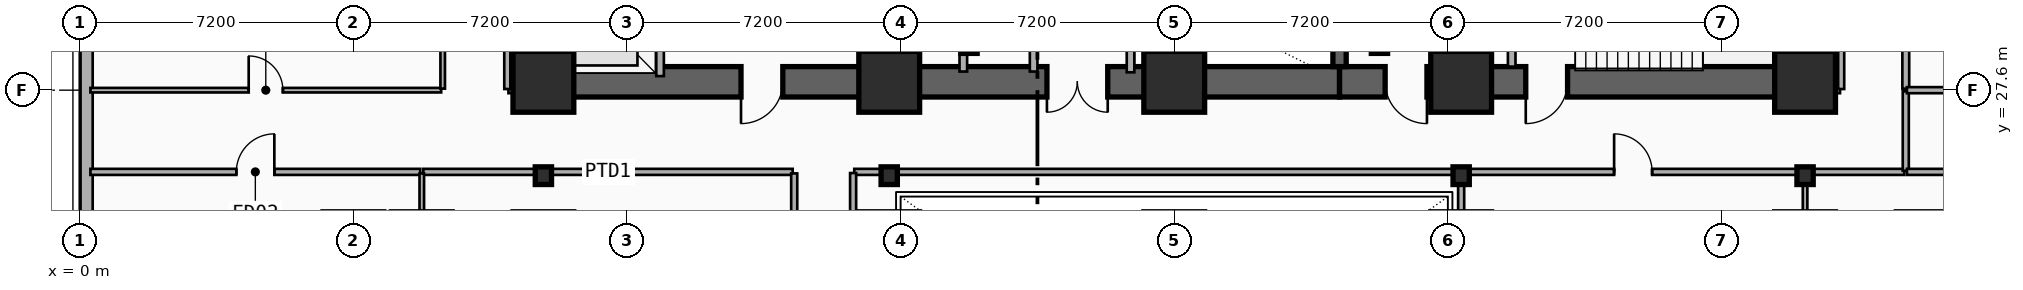
"""IFC4 building model, lengths in metres.
Left out: names, types, materials, properties, quantities, classifications, styles, units other than length and angle.
Written with IfcOpenShell. Run it as: python <this file> out.ifc"""

import sys

from ifc_helpers import new_model, si_unit, direction, frame, frame_2d, origin, origin_2d, place, context, subcontext, project, spatial, rectangle, i_section, extrude, element, fill, save


model = new_model("IFC4")
c1 = context("Model", 3, precision=1e-05, world=origin(), true_north=direction((0.0, 1.0)))
c2 = subcontext(c1, "Body", "Model", "MODEL_VIEW")
j1 = project(units=[si_unit("LENGTHUNIT", "METRE"), si_unit("PLANEANGLEUNIT", "RADIAN")], contexts=[c1])
p1 = place(None, origin())
s1 = spatial("IfcSite", under=j1, at=p1, CompositionType="ELEMENT")
p2 = place(p1, origin())
s2 = spatial("IfcBuilding", under=s1, at=p2, CompositionType="ELEMENT")
p3 = place(p2, frame((0.0, 0.0, 24.2)))
s3 = spatial("IfcBuildingStorey", under=s2, at=p3, CompositionType="ELEMENT", Elevation=24.2)
p4 = place(p3, frame((21.18, 27.82, 0.0), z_axis=(0.0, 0.0, 1.0), x_axis=(-1.0, 0.0, 0.0)))
e1 = element("IfcWall", 1, at=p4, inside=s3, PredefinedType="SHEAR", context=c2, shape_type="SweptSolid", body=[
    extrude(rectangle(XDim=9.03, YDim=0.8, at=frame_2d((4.515, 0.0))), origin(), (0.0, 0.0, 1.0), 4.8),
])
p5 = place(p4, frame((2.68, 0.0, 0.0)))
e2 = element("IfcOpeningElement", 2, at=p5, cuts=e1, PredefinedType="OPENING", context=c2, shape_type="SweptSolid", body=[
    extrude(rectangle(XDim=1.1, YDim=2.15, at=frame_2d((0.55, 1.075))), frame((0.0, 0.41, 0.0), z_axis=(0.0, -1.0, 0.0), x_axis=(1.0, 0.0, 0.0)), (0.0, 0.0, 1.0), 0.82),
])
p6 = place(p3, frame((33.15, 27.82, 0.0), z_axis=(0.0, 0.0, 1.0), x_axis=(-1.0, 0.0, 0.0)))
e3 = element("IfcWall", 3, at=p6, inside=s3, PredefinedType="SHEAR", context=c2, shape_type="SweptSolid", body=[
    extrude(rectangle(XDim=11.97, YDim=0.8, at=frame_2d((5.985, 0.0))), origin(), (0.0, 0.0, 1.0), 4.8),
])
p7 = place(p6, frame((6.1, 0.0, 0.0)))
e4 = element("IfcOpeningElement", 4, at=p7, cuts=e3, PredefinedType="OPENING", context=c2, shape_type="SweptSolid", body=[
    extrude(rectangle(XDim=1.6, YDim=2.2, at=frame_2d((0.8, 1.1))), frame((0.0, 0.41, 0.0), z_axis=(0.0, -1.0, 0.0), x_axis=(1.0, 0.0, 0.0)), (0.0, 0.0, 1.0), 0.82),
])
p8 = place(p3, frame((45.38, 27.82, 0.0), z_axis=(0.0, 0.0, 1.0), x_axis=(-1.0, 0.0, 0.0)))
e5 = element("IfcWall", 5, at=p8, inside=s3, PredefinedType="SHEAR", context=c2, shape_type="SweptSolid", body=[
    extrude(rectangle(XDim=12.23, YDim=0.8, at=frame_2d((6.115, 0.0))), origin(), (0.0, 0.0, 1.0), 4.8),
])
p9 = place(p8, frame((9.93, 0.0, 0.0)))
e6 = element("IfcOpeningElement", 6, at=p9, cuts=e5, PredefinedType="OPENING", context=c2, shape_type="SweptSolid", body=[
    extrude(rectangle(XDim=1.1, YDim=2.15, at=frame_2d((0.55, 1.075))), frame((0.0, 0.41, 0.0), z_axis=(0.0, -1.0, 0.0), x_axis=(1.0, 0.0, 0.0)), (0.0, 0.0, 1.0), 0.82),
])
p10 = place(p8, frame((6.23, 0.0, 0.0)))
e7 = element("IfcOpeningElement", 7, at=p10, cuts=e5, PredefinedType="OPENING", context=c2, shape_type="SweptSolid", body=[
    extrude(rectangle(XDim=1.1, YDim=2.15, at=frame_2d((0.55, 1.075))), frame((0.0, 0.41, 0.0), z_axis=(0.0, -1.0, 0.0), x_axis=(1.0, 0.0, 0.0)), (0.0, 0.0, 1.0), 0.82),
])
for number, where, z_axis, x_axis in (
    (8, (12.15, 28.22, 0.0), (0.0, 0.0, 1.0), (0.0, 1.0, 0.0)),
    (9, (45.38, 28.22, 0.0), (0.0, 0.0, 1.0), (0.0, 1.0, 0.0)),
):
    element("IfcWall", number, at=place(p3, frame(where, z_axis=z_axis, x_axis=x_axis)), inside=s3, PredefinedType="SHEAR", context=c2, shape_type="SweptSolid", body=[
        extrude(rectangle(XDim=8.43, YDim=0.8, at=frame_2d((4.215, 0.0))), origin(), (0.0, 0.0, 1.0), 4.8),
    ])
for number, where, z_axis, x_axis in (
    (10, (21.18, 28.22, 0.0), (0.0, 0.0, 1.0), (0.0, 1.0, 0.0)),
    (11, (33.15, 28.22, 0.0), (0.0, 0.0, 1.0), (0.0, 1.0, 0.0)),
):
    element("IfcWall", number, at=place(p3, frame(where, z_axis=z_axis, x_axis=x_axis)), inside=s3, PredefinedType="SHEAR", context=c2, shape_type="SweptSolid", body=[
        extrude(rectangle(XDim=8.43, YDim=0.35, at=frame_2d((4.215, 0.0))), origin(), (0.0, 0.0, 1.0), 4.8),
    ])
p11 = place(p3, frame((36.38, 28.22, 0.0), z_axis=(0.0, 0.0, 1.0), x_axis=(0.0, 1.0, 0.0)))
e12 = element("IfcWall", 12, at=p11, inside=s3, PredefinedType="SHEAR", context=c2, shape_type="SweptSolid", body=[
    extrude(rectangle(XDim=8.43, YDim=0.35, at=frame_2d((4.215, 0.0))), origin(), (0.0, 0.0, 1.0), 4.8),
])
p12 = place(p11, frame((3.56, 0.0, 0.0)))
e13 = element("IfcOpeningElement", 13, at=p12, cuts=e12, PredefinedType="OPENING", context=c2, shape_type="SweptSolid", body=[
    extrude(rectangle(XDim=1.1, YDim=2.15, at=frame_2d((0.55, 1.075))), frame((0.0, 0.185, 0.0), z_axis=(0.0, -1.0, 0.0), x_axis=(1.0, 0.0, 0.0)), (0.0, 0.0, 1.0), 0.37),
])
for number, where, z_axis, x_axis in (
    (14, (23.4, 28.8, 0.0), (0.0, 0.0, 1.0), (1.0, 0.0, 0.0)),
    (15, (34.2, 28.8, 0.0), (0.0, 0.0, 1.0), (1.0, 0.0, 0.0)),
):
    element("IfcColumn", number, at=place(p3, frame(where, z_axis=z_axis, x_axis=x_axis)), inside=s3, PredefinedType="COLUMN", context=c2, shape_type="SweptSolid", body=[
        extrude(i_section(OverallWidth=0.428, OverallDepth=0.465, WebThickness=0.045, FlangeThickness=0.073, FilletRadius=0.015, at=origin_2d()), origin(), (0.0, 0.0, 1.0), 4.8),
    ])
for number, where, z_axis, x_axis in (
    (16, (12.2, 27.82, 0.0), (0.0, 0.0, 1.0), (1.0, 0.0, 0.0)),
    (17, (21.3, 27.82, 0.0), (0.0, 0.0, 1.0), (1.0, 0.0, 0.0)),
    (18, (28.8, 27.82, 0.0), (0.0, 0.0, 1.0), (1.0, 0.0, 0.0)),
    (19, (36.35, 27.82, 0.0), (0.0, 0.0, 1.0), (1.0, 0.0, 0.0)),
    (20, (45.4, 27.82, 0.0), (0.0, 0.0, 1.0), (1.0, 0.0, 0.0)),
):
    element("IfcColumn", number, at=place(p3, frame(where, z_axis=z_axis, x_axis=x_axis)), inside=s3, PredefinedType="COLUMN", context=c2, shape_type="SweptSolid", body=[
        extrude(rectangle(XDim=1.6, YDim=1.6, at=origin_2d()), origin(), (0.0, 0.0, 1.0), 4.8),
    ])
for number, where, z_axis, x_axis in (
    (21, (12.2, 25.35, 0.0), (0.0, 0.0, 1.0), (1.0, 0.0, 0.0)),
    (22, (21.3, 25.35, 0.0), (0.0, 0.0, 1.0), (1.0, 0.0, 0.0)),
    (23, (36.35, 25.35, 0.0), (0.0, 0.0, 1.0), (1.0, 0.0, 0.0)),
    (24, (45.4, 25.35, 0.0), (0.0, 0.0, 1.0), (1.0, 0.0, 0.0)),
):
    element("IfcColumn", number, at=place(p3, frame(where, z_axis=z_axis, x_axis=x_axis)), inside=s3, PredefinedType="COLUMN", context=c2, shape_type="SweptSolid", body=[
        extrude(i_section(OverallWidth=0.428, OverallDepth=0.465, WebThickness=0.045, FlangeThickness=0.073, FilletRadius=0.015, at=origin_2d()), origin(), (0.0, 0.0, 1.0), 4.8),
    ])
p13 = place(p3, frame((0.18, 7.2, 0.0), z_axis=(0.0, 0.0, 1.0), x_axis=(0.0, 1.0, 0.0)))
e25 = element("IfcWall", 25, at=p13, inside=s3, PredefinedType="SOLIDWALL", context=c2, shape_type="SweptSolid", body=[
    extrude(rectangle(XDim=34.4, YDim=0.32, at=frame_2d((17.2, 0.0))), origin(), (0.0, 0.0, 1.0), 4.48),
])
p14 = place(p13, frame((22.35, 0.0, 0.9)))
e26 = element("IfcOpeningElement", 26, at=p14, cuts=e25, PredefinedType="OPENING", context=c2, shape_type="SweptSolid", body=[
    extrude(rectangle(XDim=2.4, YDim=1.8, at=frame_2d((1.2, 0.9))), frame((0.0, 0.17, 0.0), z_axis=(0.0, -1.0, 0.0), x_axis=(1.0, 0.0, 0.0)), (0.0, 0.0, 1.0), 0.34),
])
p15 = place(p13, frame((26.4, 0.0, 0.9)))
e27 = element("IfcOpeningElement", 27, at=p15, cuts=e25, PredefinedType="OPENING", context=c2, shape_type="SweptSolid", body=[
    extrude(rectangle(XDim=2.4, YDim=1.8, at=frame_2d((1.2, 0.9))), frame((0.0, 0.17, 0.0), z_axis=(0.0, -1.0, 0.0), x_axis=(1.0, 0.0, 0.0)), (0.0, 0.0, 1.0), 0.34),
])
p16 = place(p13, frame((0.847, 0.0, 0.9)))
e28 = element("IfcOpeningElement", 28, at=p16, cuts=e25, PredefinedType="OPENING", context=c2, shape_type="SweptSolid", body=[
    extrude(rectangle(XDim=2.4, YDim=1.8, at=frame_2d((1.2, 0.9))), frame((0.0, 0.17, 0.0), z_axis=(0.0, -1.0, 0.0), x_axis=(1.0, 0.0, 0.0)), (0.0, 0.0, 1.0), 0.34),
])
p17 = place(p13, frame((3.773, 0.0, 0.9)))
e29 = element("IfcOpeningElement", 29, at=p17, cuts=e25, PredefinedType="OPENING", context=c2, shape_type="SweptSolid", body=[
    extrude(rectangle(XDim=2.4, YDim=1.8, at=frame_2d((1.2, 0.9))), frame((0.0, 0.17, 0.0), z_axis=(0.0, -1.0, 0.0), x_axis=(1.0, 0.0, 0.0)), (0.0, 0.0, 1.0), 0.34),
])
p18 = place(p13, frame((9.25, 0.0, 0.9)))
e30 = element("IfcOpeningElement", 30, at=p18, cuts=e25, PredefinedType="OPENING", context=c2, shape_type="SweptSolid", body=[
    extrude(rectangle(XDim=2.4, YDim=1.8, at=frame_2d((1.2, 0.9))), frame((0.0, 0.17, 0.0), z_axis=(0.0, -1.0, 0.0), x_axis=(1.0, 0.0, 0.0)), (0.0, 0.0, 1.0), 0.34),
])
p19 = place(p13, frame((13.6, 0.0, 0.9)))
e31 = element("IfcOpeningElement", 31, at=p19, cuts=e25, PredefinedType="OPENING", context=c2, shape_type="SweptSolid", body=[
    extrude(rectangle(XDim=2.4, YDim=1.8, at=frame_2d((1.2, 0.9))), frame((0.0, 0.17, 0.0), z_axis=(0.0, -1.0, 0.0), x_axis=(1.0, 0.0, 0.0)), (0.0, 0.0, 1.0), 0.34),
])
p20 = place(p3, frame((15.27, 27.97, 0.0), z_axis=(0.0, 0.0, 1.0), x_axis=(0.0, 1.0, 0.0)))
e32 = element("IfcWall", 32, at=p20, inside=s3, PredefinedType="PARTITIONING", context=c2, shape_type="SweptSolid", body=[
    extrude(rectangle(XDim=2.96, YDim=0.2, at=frame_2d((1.48, 0.0))), origin(), (0.0, 0.0, 1.0), 3.452),
])
p21 = place(p20, frame((0.93, 0.0, 0.0)))
e33 = element("IfcOpeningElement", 33, at=p21, cuts=e32, PredefinedType="OPENING", context=c2, shape_type="SweptSolid", body=[
    extrude(rectangle(XDim=1.1, YDim=2.15, at=frame_2d((0.55, 1.075))), frame((0.0, 0.11, 0.0), z_axis=(0.0, -1.0, 0.0), x_axis=(1.0, 0.0, 0.0)), (0.0, 0.0, 1.0), 0.22),
])
p22 = place(p3, frame((27.65, 28.07, 0.0), z_axis=(0.0, 0.0, 1.0), x_axis=(0.0, 1.0, 0.0)))
e34 = element("IfcWall", 34, at=p22, inside=s3, PredefinedType="PARTITIONING", context=c2, shape_type="SweptSolid", body=[
    extrude(rectangle(XDim=2.58, YDim=0.2, at=frame_2d((1.29, 0.0))), origin(), (0.0, 0.0, 1.0), 3.452),
])
p23 = place(p3, frame((37.68, 28.22, 0.0), z_axis=(0.0, 0.0, 1.0), x_axis=(0.0, 1.0, 0.0)))
e35 = element("IfcWall", 35, at=p23, inside=s3, PredefinedType="PARTITIONING", context=c2, shape_type="SweptSolid", body=[
    extrude(rectangle(XDim=3.03, YDim=0.2, at=frame_2d((1.515, 0.0))), origin(), (0.0, 0.0, 1.0), 4.48),
])
p24 = place(p3, frame((25.1, 28.09, 0.0), z_axis=(0.0, 0.0, 1.0), x_axis=(0.0, 1.0, 0.0)))
e36 = element("IfcWall", 36, at=p24, inside=s3, PredefinedType="PARTITIONING", context=c2, shape_type="SweptSolid", body=[
    extrude(rectangle(XDim=4.12, YDim=0.2, at=frame_2d((2.06, 0.0))), origin(), (0.0, 0.0, 1.0), 4.48),
])
p25 = place(p24, frame((1.46, 0.0, 0.0)))
e37 = element("IfcOpeningElement", 37, at=p25, cuts=e36, PredefinedType="OPENING", context=c2, shape_type="SweptSolid", body=[
    extrude(rectangle(XDim=1.2, YDim=2.15, at=frame_2d((0.6, 1.075))), frame((0.0, 0.11, 0.0), z_axis=(0.0, -1.0, 0.0), x_axis=(1.0, 0.0, 0.0)), (0.0, 0.0, 1.0), 0.22),
])
p26 = place(p3, frame((23.25, 28.09, 0.0), z_axis=(0.0, 0.0, 1.0), x_axis=(0.0, 1.0, 0.0)))
e38 = element("IfcWall", 38, at=p26, inside=s3, PredefinedType="PARTITIONING", context=c2, shape_type="SweptSolid", body=[
    extrude(rectangle(XDim=4.12, YDim=0.2, at=frame_2d((2.06, 0.0))), origin(), (0.0, 0.0, 1.0), 4.48),
])
p27 = place(p3, frame((0.28, 27.6, 0.0), z_axis=(0.0, 0.0, 1.0), x_axis=(1.0, 0.0, 0.0)))
e39 = element("IfcWall", 39, at=p27, inside=s3, PredefinedType="PARTITIONING", context=c2, shape_type="SweptSolid", body=[
    extrude(rectangle(XDim=9.23, YDim=0.12, at=frame_2d((4.615, 0.0))), origin(), (0.0, 0.0, 1.0), 4.48),
])
p28 = place(p27, frame((4.165, 0.0, 0.0)))
e40 = element("IfcOpeningElement", 40, at=p28, cuts=e39, PredefinedType="OPENING", context=c2, shape_type="SweptSolid", body=[
    extrude(rectangle(XDim=0.9, YDim=2.1, at=frame_2d((0.45, 1.05))), frame((0.0, 0.07, 0.0), z_axis=(0.0, -1.0, 0.0), x_axis=(1.0, 0.0, 0.0)), (0.0, 0.0, 1.0), 0.14),
])
p29 = place(p3, frame((0.28, 25.45, 0.0), z_axis=(0.0, 0.0, 1.0), x_axis=(1.0, 0.0, 0.0)))
e41 = element("IfcWall", 41, at=p29, inside=s3, PredefinedType="PARTITIONING", context=c2, shape_type="SweptSolid", body=[
    extrude(rectangle(XDim=8.68, YDim=0.16, at=frame_2d((4.34, 0.0))), origin(), (0.0, 0.0, 1.0), 4.48),
])
p30 = place(p29, frame((3.84, 0.0, 0.0)))
e42 = element("IfcOpeningElement", 42, at=p30, cuts=e41, PredefinedType="OPENING", context=c2, shape_type="SweptSolid", body=[
    extrude(rectangle(XDim=1.0, YDim=2.15, at=frame_2d((0.5, 1.075))), frame((0.0, 0.09, 0.0), z_axis=(0.0, -1.0, 0.0), x_axis=(1.0, 0.0, 0.0)), (0.0, 0.0, 1.0), 0.18),
])
p31 = place(p3, frame((9.04, 25.45, 0.0), z_axis=(0.0, 0.0, 1.0), x_axis=(1.0, 0.0, 0.0)))
e43 = element("IfcWall", 43, at=p31, inside=s3, PredefinedType="PARTITIONING", context=c2, shape_type="SweptSolid", body=[
    extrude(rectangle(XDim=9.72, YDim=0.16, at=frame_2d((4.86, 0.0))), origin(), (0.0, 0.0, 1.0), 3.452),
])
p32 = place(p3, frame((36.39, 25.45, 0.0), z_axis=(0.0, 0.0, 1.0), x_axis=(1.0, 0.0, 0.0)))
e44 = element("IfcWall", 44, at=p32, inside=s3, PredefinedType="PARTITIONING", context=c2, shape_type="SweptSolid", body=[
    extrude(rectangle(XDim=8.97, YDim=0.16, at=frame_2d((4.485, 0.0))), origin(), (0.0, 0.0, 1.0), 3.452),
])
p33 = place(p32, frame((3.985, 0.0, 0.0)))
e45 = element("IfcOpeningElement", 45, at=p33, cuts=e44, PredefinedType="OPENING", context=c2, shape_type="SweptSolid", body=[
    extrude(rectangle(XDim=1.0, YDim=2.15, at=frame_2d((0.5, 1.075))), frame((0.0, 0.09, 0.0), z_axis=(0.0, -1.0, 0.0), x_axis=(1.0, 0.0, 0.0)), (0.0, 0.0, 1.0), 0.18),
])
p34 = place(p3, frame((45.44, 25.45, 0.0), z_axis=(0.0, 0.0, 1.0), x_axis=(1.0, 0.0, 0.0)))
e46 = element("IfcWall", 46, at=p34, inside=s3, PredefinedType="PARTITIONING", context=c2, shape_type="SweptSolid", body=[
    extrude(rectangle(XDim=2.57, YDim=0.16, at=frame_2d((1.285, 0.0))), origin(), (0.0, 0.0, 1.0), 3.452),
])
p35 = place(p3, frame((9.55, 27.64, 0.0), z_axis=(0.0, 0.0, 1.0), x_axis=(0.0, 1.0, 0.0)))
e47 = element("IfcWall", 47, at=p35, inside=s3, PredefinedType="PARTITIONING", context=c2, shape_type="SweptSolid", body=[
    extrude(rectangle(XDim=10.27, YDim=0.12, at=frame_2d((5.135, 0.0))), origin(), (0.0, 0.0, 1.0), 4.48),
])
p36 = place(p35, frame((4.685, 0.0, 0.0)))
e48 = element("IfcOpeningElement", 48, at=p36, cuts=e47, PredefinedType="OPENING", context=c2, shape_type="SweptSolid", body=[
    extrude(rectangle(XDim=0.9, YDim=2.1, at=frame_2d((0.45, 1.05))), frame((0.0, 0.07, 0.0), z_axis=(0.0, -1.0, 0.0), x_axis=(1.0, 0.0, 0.0)), (0.0, 0.0, 1.0), 0.14),
])
p37 = place(p3, frame((48.05, 27.64, 0.0), z_axis=(0.0, 0.0, 1.0), x_axis=(0.0, 1.0, 0.0)))
e49 = element("IfcWall", 49, at=p37, inside=s3, PredefinedType="PLUMBINGWALL", context=c2, shape_type="SweptSolid", body=[
    extrude(rectangle(XDim=3.92, YDim=0.18, at=frame_2d((1.96, 0.0))), origin(), (0.0, 0.0, 1.0), 4.48),
])
p38 = place(p37, frame((1.535, 0.0, 0.0)))
e50 = element("IfcOpeningElement", 50, at=p38, cuts=e49, PredefinedType="OPENING", context=c2, shape_type="SweptSolid", body=[
    extrude(rectangle(XDim=0.85, YDim=2.1, at=frame_2d((0.425, 1.05))), frame((0.0, 0.1, 0.0), z_axis=(0.0, -1.0, 0.0), x_axis=(1.0, 0.0, 0.0)), (0.0, 0.0, 1.0), 0.2),
])
p39 = place(p3, frame((18.8, 14.24, 0.0), z_axis=(0.0, 0.0, 1.0), x_axis=(0.0, 1.0, 0.0)))
e51 = element("IfcWall", 51, at=p39, inside=s3, PredefinedType="PARTITIONING", context=c2, shape_type="SweptSolid", body=[
    extrude(rectangle(XDim=11.17, YDim=0.16, at=frame_2d((5.585, 0.0))), origin(), (0.0, 0.0, 1.0), 3.452),
])
p40 = place(p3, frame((9.0, 14.24, 0.0), z_axis=(0.0, 0.0, 1.0), x_axis=(0.0, 1.0, 0.0)))
e52 = element("IfcWall", 52, at=p40, inside=s3, PredefinedType="PARTITIONING", context=c2, shape_type="SweptSolid", body=[
    extrude(rectangle(XDim=11.17, YDim=0.12, at=frame_2d((5.585, 0.0))), origin(), (0.0, 0.0, 1.0), 3.81),
])
p41 = place(p40, frame((5.135, 0.0, 0.0)))
e53 = element("IfcOpeningElement", 53, at=p41, cuts=e52, PredefinedType="OPENING", context=c2, shape_type="SweptSolid", body=[
    extrude(rectangle(XDim=0.9, YDim=2.1, at=frame_2d((0.45, 1.05))), frame((0.0, 0.07, 0.0), z_axis=(0.0, -1.0, 0.0), x_axis=(1.0, 0.0, 0.0)), (0.0, 0.0, 1.0), 0.14),
])
p42 = place(p3, frame((45.4, 14.24, 0.0), z_axis=(0.0, 0.0, 1.0), x_axis=(0.0, 1.0, 0.0)))
e54 = element("IfcWall", 54, at=p42, inside=s3, PredefinedType="PARTITIONING", context=c2, shape_type="SweptSolid", body=[
    extrude(rectangle(XDim=11.17, YDim=0.12, at=frame_2d((5.585, 0.0))), origin(), (0.0, 0.0, 1.0), 3.452),
])
p43 = place(p42, frame((5.135, 0.0, 0.0)))
e55 = element("IfcOpeningElement", 55, at=p43, cuts=e54, PredefinedType="OPENING", context=c2, shape_type="SweptSolid", body=[
    extrude(rectangle(XDim=0.9, YDim=2.1, at=frame_2d((0.45, 1.05))), frame((0.0, 0.07, 0.0), z_axis=(0.0, -1.0, 0.0), x_axis=(1.0, 0.0, 0.0)), (0.0, 0.0, 1.0), 0.14),
])
p44 = place(p3, frame((20.38, 25.45, 0.0), z_axis=(0.0, 0.0, 1.0), x_axis=(1.0, 0.0, 0.0)))
e56 = element("IfcWall", 56, at=p44, inside=s3, PredefinedType="PARTITIONING", context=c2, shape_type="SweptSolid", body=[
    extrude(rectangle(XDim=15.94, YDim=0.16, at=frame_2d((7.97, 0.0))), origin(), (0.0, 0.0, 1.0), 3.452),
])
p45 = place(p3, frame((11.28, 27.6, 0.0), z_axis=(0.0, 0.0, 1.0), x_axis=(1.0, 0.0, 0.0)))
e57 = element("IfcWall", 57, at=p45, inside=s3, PredefinedType="PARTITIONING", context=c2, shape_type="SweptSolid", body=[
    extrude(rectangle(XDim=0.84, YDim=0.16, at=frame_2d((0.42, 0.0))), origin(), (0.0, 0.0, 1.0), 3.452),
])
p46 = place(p3, frame((45.41, 27.6, 0.0), z_axis=(0.0, 0.0, 1.0), x_axis=(1.0, 0.0, 0.0)))
e58 = element("IfcWall", 58, at=p46, inside=s3, PredefinedType="PARTITIONING", context=c2, shape_type="SweptSolid", body=[
    extrude(rectangle(XDim=0.91, YDim=0.16, at=frame_2d((0.455, 0.0))), origin(), (0.0, 0.0, 1.0), 3.452),
])
p47 = place(p3, frame((48.05, 25.48, 0.0), z_axis=(0.0, 0.0, 1.0), x_axis=(0.0, 1.0, 0.0)))
e59 = element("IfcWall", 59, at=p47, inside=s3, PredefinedType="PARTITIONING", context=c2, shape_type="SweptSolid", body=[
    extrude(rectangle(XDim=2.09, YDim=0.16, at=frame_2d((1.045, 0.0))), origin(), (0.0, 0.0, 1.0), 4.48),
])
for number, where, z_axis, x_axis in (
    (60, (11.25, 27.63, 0.0), (0.0, 0.0, 1.0), (0.0, 1.0, 0.0)),
    (61, (46.35, 27.63, 0.0), (0.0, 0.0, 1.0), (0.0, 1.0, 0.0)),
):
    element("IfcWall", number, at=place(p3, frame(where, z_axis=z_axis, x_axis=x_axis)), inside=s3, PredefinedType="PARTITIONING", context=c2, shape_type="SweptSolid", body=[
        extrude(rectangle(XDim=10.29, YDim=0.16, at=frame_2d((5.145, 0.0))), origin(), (0.0, 0.0, 1.0), 4.48),
    ])
p48 = place(p3, frame((48.08, 27.6, 0.0), z_axis=(0.0, 0.0, 1.0), x_axis=(1.0, 0.0, 0.0)))
e62 = element("IfcWall", 62, at=p48, inside=s3, PredefinedType="PARTITIONING", context=c2, shape_type="SweptSolid", body=[
    extrude(rectangle(XDim=4.69, YDim=0.16, at=frame_2d((2.345, 0.0))), origin(), (0.0, 0.0, 1.0), 4.48),
])
for number, where, z_axis, x_axis in (
    (63, (20.35, 14.23, 0.0), (0.0, 0.0, 1.0), (0.0, 1.0, 0.0)),
    (64, (36.35, 14.23, 0.0), (0.0, 0.0, 1.0), (0.0, 1.0, 0.0)),
):
    element("IfcWall", number, at=place(p3, frame(where, z_axis=z_axis, x_axis=x_axis)), inside=s3, PredefinedType="PARTITIONING", context=c2, shape_type="SweptSolid", body=[
        extrude(rectangle(XDim=11.19, YDim=0.16, at=frame_2d((5.595, 0.0))), origin(), (0.0, 0.0, 1.0), 3.452),
    ])
p49 = place(p3, frame((48.08, 25.45, 0.0), z_axis=(0.0, 0.0, 1.0), x_axis=(1.0, 0.0, 0.0)))
e65 = element("IfcWall", 65, at=p49, inside=s3, PredefinedType="PARTITIONING", context=c2, shape_type="SweptSolid", body=[
    extrude(rectangle(XDim=9.21, YDim=0.16, at=frame_2d((4.605, 0.0))), origin(), (0.0, 0.0, 1.0), 4.48),
])
p50 = place(p5, origin())
e66 = element("IfcDoor", 66, at=p50, inside=s3, OperationType="SINGLE_SWING_RIGHT", PredefinedType="DOOR", context=c2, shape_type="SweptSolid", body=[
    extrude(rectangle(XDim=1.1, YDim=2.15, at=frame_2d((0.55, 1.075))), frame((0.0, 0.025, 0.0), z_axis=(0.0, -1.0, 0.0), x_axis=(1.0, 0.0, 0.0)), (0.0, 0.0, 1.0), 0.05),
])
fill(e2, e66)
p51 = place(p9, origin())
e67 = element("IfcDoor", 67, at=p51, inside=s3, OperationType="SINGLE_SWING_LEFT", PredefinedType="DOOR", context=c2, shape_type="SweptSolid", body=[
    extrude(rectangle(XDim=1.1, YDim=2.15, at=frame_2d((0.55, 1.075))), frame((0.0, 0.025, 0.0), z_axis=(0.0, -1.0, 0.0), x_axis=(1.0, 0.0, 0.0)), (0.0, 0.0, 1.0), 0.05),
])
fill(e6, e67)
p52 = place(p10, origin())
e68 = element("IfcDoor", 68, at=p52, inside=s3, OperationType="SINGLE_SWING_RIGHT", PredefinedType="DOOR", context=c2, shape_type="SweptSolid", body=[
    extrude(rectangle(XDim=1.1, YDim=2.15, at=frame_2d((0.55, 1.075))), frame((0.0, 0.025, 0.0), z_axis=(0.0, -1.0, 0.0), x_axis=(1.0, 0.0, 0.0)), (0.0, 0.0, 1.0), 0.05),
])
fill(e7, e68)
p53 = place(p7, origin())
e69 = element("IfcDoor", 69, at=p53, inside=s3, OperationType="SINGLE_SWING_LEFT", PredefinedType="DOOR", context=c2, shape_type="SweptSolid", body=[
    extrude(rectangle(XDim=1.6, YDim=2.2, at=frame_2d((0.8, 1.1))), frame((0.0, 0.025, 0.0), z_axis=(0.0, -1.0, 0.0), x_axis=(1.0, 0.0, 0.0)), (0.0, 0.0, 1.0), 0.05),
])
fill(e4, e69)
p54 = place(p28, origin())
e70 = element("IfcDoor", 70, at=p54, inside=s3, OperationType="SINGLE_SWING_LEFT", PredefinedType="DOOR", context=c2, shape_type="SweptSolid", body=[
    extrude(rectangle(XDim=0.9, YDim=2.1, at=frame_2d((0.45, 1.05))), frame((0.0, 0.025, 0.0), z_axis=(0.0, -1.0, 0.0), x_axis=(1.0, 0.0, 0.0)), (0.0, 0.0, 1.0), 0.05),
])
fill(e40, e70)
p55 = place(p30, origin())
e71 = element("IfcDoor", 71, at=p55, inside=s3, OperationType="SINGLE_SWING_RIGHT", PredefinedType="DOOR", context=c2, shape_type="SweptSolid", body=[
    extrude(rectangle(XDim=1.0, YDim=2.15, at=frame_2d((0.5, 1.075))), frame((0.0, 0.025, 0.0), z_axis=(0.0, -1.0, 0.0), x_axis=(1.0, 0.0, 0.0)), (0.0, 0.0, 1.0), 0.05),
])
fill(e42, e71)
p56 = place(p33, origin())
e72 = element("IfcDoor", 72, at=p56, inside=s3, OperationType="SINGLE_SWING_LEFT", PredefinedType="DOOR", context=c2, shape_type="SweptSolid", body=[
    extrude(rectangle(XDim=1.0, YDim=2.15, at=frame_2d((0.5, 1.075))), frame((0.0, 0.025, 0.0), z_axis=(0.0, -1.0, 0.0), x_axis=(1.0, 0.0, 0.0)), (0.0, 0.0, 1.0), 0.05),
])
fill(e45, e72)
save(model, sys.argv[1])
